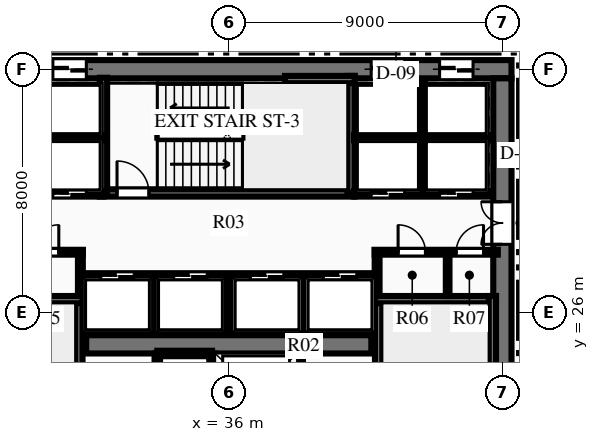
"""IFC4 building model, lengths in metres.
Left out: names, types, materials, properties, quantities, classifications, styles, units other than length and angle.
Written with IfcOpenShell. Run it as: python <this file> out.ifc"""

import sys

from ifc_helpers import new_model, si_unit, direction, frame, frame_2d, origin, place, context, subcontext, project, spatial, rectangle, extrude, element, fill, save


model = new_model("IFC4")
c1 = context("Model", 3, precision=1e-05, world=origin(), true_north=direction((0.0, 1.0)))
c2 = subcontext(c1, "Body", "Model", "MODEL_VIEW")
j1 = project(units=[si_unit("LENGTHUNIT", "METRE"), si_unit("PLANEANGLEUNIT", "RADIAN")], contexts=[c1])
p1 = place(None, origin())
s1 = spatial("IfcSite", under=j1, at=p1, CompositionType="ELEMENT")
p2 = place(p1, origin())
s2 = spatial("IfcBuilding", under=s1, at=p2, CompositionType="ELEMENT")
p3 = place(p2, frame((0.0, 0.0, 40.2)))
s3 = spatial("IfcBuildingStorey", under=s2, at=p3, CompositionType="ELEMENT", Elevation=40.2)
p4 = place(p3, frame((26.7, 34.0, 0.0), z_axis=(0.0, 0.0, 1.0), x_axis=(1.0, 0.0, 0.0)))
e1 = element("IfcWall", 1, at=p4, inside=s3, PredefinedType="SHEAR", context=c2, shape_type="SweptSolid", body=[
    extrude(rectangle(XDim=18.6, YDim=0.6, at=frame_2d((9.3, 0.0))), origin(), (0.0, 0.0, 1.0), 3.75),
])
p5 = place(p4, frame((1.265, 0.0, 0.0)))
e2 = element("IfcOpeningElement", 2, at=p5, cuts=e1, PredefinedType="OPENING", context=c2, shape_type="SweptSolid", body=[
    extrude(rectangle(XDim=1.1, YDim=2.15, at=frame_2d((0.55, 1.075))), frame((0.0, 0.31, 0.0), z_axis=(0.0, -1.0, 0.0), x_axis=(1.0, 0.0, 0.0)), (0.0, 0.0, 1.0), 0.62),
])
p6 = place(p4, frame((3.515, 0.0, 0.0)))
e3 = element("IfcOpeningElement", 3, at=p6, cuts=e1, PredefinedType="OPENING", context=c2, shape_type="SweptSolid", body=[
    extrude(rectangle(XDim=1.1, YDim=2.15, at=frame_2d((0.55, 1.075))), frame((0.0, 0.31, 0.0), z_axis=(0.0, -1.0, 0.0), x_axis=(1.0, 0.0, 0.0)), (0.0, 0.0, 1.0), 0.62),
])
p7 = place(p4, frame((13.985, 0.0, 0.0)))
e4 = element("IfcOpeningElement", 4, at=p7, cuts=e1, PredefinedType="OPENING", context=c2, shape_type="SweptSolid", body=[
    extrude(rectangle(XDim=1.1, YDim=2.15, at=frame_2d((0.55, 1.075))), frame((0.0, 0.31, 0.0), z_axis=(0.0, -1.0, 0.0), x_axis=(1.0, 0.0, 0.0)), (0.0, 0.0, 1.0), 0.62),
])
p8 = place(p4, frame((16.235, 0.0, 0.0)))
e5 = element("IfcOpeningElement", 5, at=p8, cuts=e1, PredefinedType="OPENING", context=c2, shape_type="SweptSolid", body=[
    extrude(rectangle(XDim=1.1, YDim=2.15, at=frame_2d((0.55, 1.075))), frame((0.0, 0.31, 0.0), z_axis=(0.0, -1.0, 0.0), x_axis=(1.0, 0.0, 0.0)), (0.0, 0.0, 1.0), 0.62),
])
p9 = place(p3, frame((45.0, 18.3, 0.0), z_axis=(0.0, 0.0, 1.0), x_axis=(0.0, 1.0, 0.0)))
e6 = element("IfcWall", 6, at=p9, inside=s3, PredefinedType="SHEAR", context=c2, shape_type="SweptSolid", body=[
    extrude(rectangle(XDim=15.4, YDim=0.6, at=frame_2d((7.7, 0.0))), origin(), (0.0, 0.0, 1.0), 3.75),
])
p10 = place(p9, frame((9.94, 0.0, 0.0)))
e7 = element("IfcOpeningElement", 7, at=p10, cuts=e6, PredefinedType="OPENING", context=c2, shape_type="SweptSolid", body=[
    extrude(rectangle(XDim=1.4, YDim=2.2, at=frame_2d((0.7, 1.1))), frame((0.0, 0.31, 0.0), z_axis=(0.0, -1.0, 0.0), x_axis=(1.0, 0.0, 0.0)), (0.0, 0.0, 1.0), 0.62),
])
p11 = place(p3, frame((31.31, 24.95, 0.0), z_axis=(0.0, 0.0, 1.0), x_axis=(1.0, 0.0, 0.0)))
e8 = element("IfcWall", 8, at=p11, inside=s3, PredefinedType="SHEAR", context=c2, shape_type="SweptSolid", body=[
    extrude(rectangle(XDim=9.38, YDim=0.6, at=frame_2d((4.69, 0.0))), origin(), (0.0, 0.0, 1.0), 3.75),
])
p12 = place(p3, frame((31.07, 18.28, 0.0), z_axis=(0.0, 0.0, 1.0), x_axis=(0.0, 1.0, 0.0)))
e9 = element("IfcWall", 9, at=p12, inside=s3, PredefinedType="SHEAR", context=c2, shape_type="SweptSolid", body=[
    extrude(rectangle(XDim=8.26, YDim=0.24, at=frame_2d((4.13, 0.0))), origin(), (0.0, 0.0, 1.0), 3.75),
])
p13 = place(p12, frame((0.365, 0.0, 0.0)))
e10 = element("IfcOpeningElement", 10, at=p13, cuts=e9, PredefinedType="OPENING", context=c2, shape_type="SweptSolid", body=[
    extrude(rectangle(XDim=1.05, YDim=2.15, at=frame_2d((0.525, 1.075))), frame((0.0, 0.13, 0.0), z_axis=(0.0, -1.0, 0.0), x_axis=(1.0, 0.0, 0.0)), (0.0, 0.0, 1.0), 0.26),
])
p14 = place(p3, frame((27.21, 26.42, 0.0), z_axis=(0.0, 0.0, 1.0), x_axis=(1.0, 0.0, 0.0)))
e11 = element("IfcWall", 11, at=p14, inside=s3, PredefinedType="SHEAR", context=c2, shape_type="SweptSolid", body=[
    extrude(rectangle(XDim=3.98, YDim=0.24, at=frame_2d((1.99, 0.0))), origin(), (0.0, 0.0, 1.0), 3.75),
])
p15 = place(p3, frame((40.93, 18.28, 0.0), z_axis=(0.0, 0.0, 1.0), x_axis=(0.0, 1.0, 0.0)))
e12 = element("IfcWall", 12, at=p15, inside=s3, PredefinedType="SHEAR", context=c2, shape_type="SweptSolid", body=[
    extrude(rectangle(XDim=8.26, YDim=0.24, at=frame_2d((4.13, 0.0))), origin(), (0.0, 0.0, 1.0), 3.75),
])
p16 = place(p15, frame((0.365, 0.0, 0.0)))
e13 = element("IfcOpeningElement", 13, at=p16, cuts=e12, PredefinedType="OPENING", context=c2, shape_type="SweptSolid", body=[
    extrude(rectangle(XDim=1.05, YDim=2.15, at=frame_2d((0.525, 1.075))), frame((0.0, 0.13, 0.0), z_axis=(0.0, -1.0, 0.0), x_axis=(1.0, 0.0, 0.0)), (0.0, 0.0, 1.0), 0.26),
])
p17 = place(p3, frame((40.81, 26.42, 0.0), z_axis=(0.0, 0.0, 1.0), x_axis=(1.0, 0.0, 0.0)))
e14 = element("IfcWall", 14, at=p17, inside=s3, PredefinedType="SHEAR", context=c2, shape_type="SweptSolid", body=[
    extrude(rectangle(XDim=3.98, YDim=0.24, at=frame_2d((1.99, 0.0))), origin(), (0.0, 0.0, 1.0), 3.75),
])
p18 = place(p3, frame((44.67, 18.28, 0.0), z_axis=(0.0, 0.0, 1.0), x_axis=(0.0, 1.0, 0.0)))
e15 = element("IfcWall", 15, at=p18, inside=s3, PredefinedType="SHEAR", context=c2, shape_type="SweptSolid", body=[
    extrude(rectangle(XDim=8.26, YDim=0.24, at=frame_2d((4.13, 0.0))), origin(), (0.0, 0.0, 1.0), 3.75),
])
p19 = place(p3, frame((31.76, 29.93, 0.0), z_axis=(0.0, 0.0, 1.0), x_axis=(1.0, 0.0, 0.0)))
e16 = element("IfcWall", 16, at=p19, inside=s3, PredefinedType="SHEAR", context=c2, shape_type="SweptSolid", body=[
    extrude(rectangle(XDim=8.38, YDim=0.24, at=frame_2d((4.19, 0.0))), origin(), (0.0, 0.0, 1.0), 3.75),
])
p20 = place(p19, frame((0.565, 0.0, 0.0)))
e17 = element("IfcOpeningElement", 17, at=p20, cuts=e16, PredefinedType="OPENING", context=c2, shape_type="SweptSolid", body=[
    extrude(rectangle(XDim=1.05, YDim=2.15, at=frame_2d((0.525, 1.075))), frame((0.0, 0.13, 0.0), z_axis=(0.0, -1.0, 0.0), x_axis=(1.0, 0.0, 0.0)), (0.0, 0.0, 1.0), 0.26),
])
p21 = place(p3, frame((31.88, 29.93, 0.0), z_axis=(0.0, 0.0, 1.0), x_axis=(0.0, 1.0, 0.0)))
e18 = element("IfcWall", 18, at=p21, inside=s3, PredefinedType="SHEAR", context=c2, shape_type="SweptSolid", body=[
    extrude(rectangle(XDim=3.79, YDim=0.24, at=frame_2d((1.895, 0.0))), origin(), (0.0, 0.0, 1.0), 3.75),
])
p22 = place(p3, frame((40.02, 29.93, 0.0), z_axis=(0.0, 0.0, 1.0), x_axis=(0.0, 1.0, 0.0)))
e19 = element("IfcWall", 19, at=p22, inside=s3, PredefinedType="SHEAR", context=c2, shape_type="SweptSolid", body=[
    extrude(rectangle(XDim=3.85, YDim=0.24, at=frame_2d((1.925, 0.0))), origin(), (0.0, 0.0, 1.0), 3.75),
])
p23 = place(p3, frame((37.85, 33.66, 0.0), z_axis=(0.0, 0.0, 1.0), x_axis=(1.0, 0.0, 0.0)))
e20 = element("IfcWall", 20, at=p23, inside=s3, PredefinedType="SHEAR", context=c2, shape_type="SweptSolid", body=[
    extrude(rectangle(XDim=2.29, YDim=0.24, at=frame_2d((1.145, 0.0))), origin(), (0.0, 0.0, 1.0), 3.75),
])
for number, where, z_axis, x_axis in (
    (21, (33.65, 22.05, 0.0), (0.0, 0.0, 1.0), (0.0, 1.0, 0.0)),
    (22, (35.45, 22.05, 0.0), (0.0, 0.0, 1.0), (0.0, 1.0, 0.0)),
):
    element("IfcWall", number, at=place(p3, frame(where, z_axis=z_axis, x_axis=x_axis)), inside=s3, PredefinedType="PARTITIONING", context=c2, shape_type="SweptSolid", body=[
        extrude(rectangle(XDim=2.6, YDim=0.18, at=frame_2d((1.3, 0.0))), origin(), (0.0, 0.0, 1.0), 3.44),
    ])
p24 = place(p3, frame((33.65, 24.65, 0.0), z_axis=(0.0, 0.0, 1.0), x_axis=(1.0, 0.0, 0.0)))
e23 = element("IfcWall", 23, at=p24, inside=s3, PredefinedType="PARTITIONING", context=c2, shape_type="SweptSolid", body=[
    extrude(rectangle(XDim=1.8, YDim=0.18, at=frame_2d((0.9, 0.0))), origin(), (0.0, 0.0, 1.0), 3.44),
])
p25 = place(p3, frame((38.35, 22.05, 0.0), z_axis=(0.0, 0.0, 1.0), x_axis=(0.0, 1.0, 0.0)))
e24 = element("IfcWall", 24, at=p25, inside=s3, PredefinedType="PARTITIONING", context=c2, shape_type="SweptSolid", body=[
    extrude(rectangle(XDim=2.6, YDim=0.18, at=frame_2d((1.3, 0.0))), origin(), (0.0, 0.0, 1.0), 3.44),
])
p26 = place(p3, frame((27.15, 27.98, 0.0), z_axis=(0.0, 0.0, 1.0), x_axis=(1.0, 0.0, 0.0)))
e25 = element("IfcWall", 25, at=p26, inside=s3, PredefinedType="PARTITIONING", context=c2, shape_type="SweptSolid", body=[
    extrude(rectangle(XDim=4.05, YDim=0.16, at=frame_2d((2.025, 0.0))), origin(), (0.0, 0.0, 1.0), 3.44),
])
p27 = place(p26, frame((0.47, 0.0, 0.0)))
e26 = element("IfcOpeningElement", 26, at=p27, cuts=e25, PredefinedType="OPENING", context=c2, shape_type="SweptSolid", body=[
    extrude(rectangle(XDim=0.9, YDim=2.15, at=frame_2d((0.45, 1.075))), frame((0.0, 0.09, 0.0), z_axis=(0.0, -1.0, 0.0), x_axis=(1.0, 0.0, 0.0)), (0.0, 0.0, 1.0), 0.18),
])
p28 = place(p26, frame((2.36, 0.0, 0.0)))
e27 = element("IfcOpeningElement", 27, at=p28, cuts=e25, PredefinedType="OPENING", context=c2, shape_type="SweptSolid", body=[
    extrude(rectangle(XDim=0.9, YDim=2.15, at=frame_2d((0.45, 1.075))), frame((0.0, 0.09, 0.0), z_axis=(0.0, -1.0, 0.0), x_axis=(1.0, 0.0, 0.0)), (0.0, 0.0, 1.0), 0.18),
])
p29 = place(p3, frame((31.12, 26.54, 0.0), z_axis=(0.0, 0.0, 1.0), x_axis=(0.0, 1.0, 0.0)))
e28 = element("IfcWall", 28, at=p29, inside=s3, PredefinedType="PARTITIONING", context=c2, shape_type="SweptSolid", body=[
    extrude(rectangle(XDim=1.51, YDim=0.16, at=frame_2d((0.755, 0.0))), origin(), (0.0, 0.0, 1.0), 3.44),
])
p30 = place(p3, frame((40.8, 27.98, 0.0), z_axis=(0.0, 0.0, 1.0), x_axis=(1.0, 0.0, 0.0)))
e29 = element("IfcWall", 29, at=p30, inside=s3, PredefinedType="PARTITIONING", context=c2, shape_type="SweptSolid", body=[
    extrude(rectangle(XDim=4.05, YDim=0.16, at=frame_2d((2.025, 0.0))), origin(), (0.0, 0.0, 1.0), 3.44),
])
p31 = place(p30, frame((0.77, 0.0, 0.0)))
e30 = element("IfcOpeningElement", 30, at=p31, cuts=e29, PredefinedType="OPENING", context=c2, shape_type="SweptSolid", body=[
    extrude(rectangle(XDim=0.9, YDim=2.15, at=frame_2d((0.45, 1.075))), frame((0.0, 0.09, 0.0), z_axis=(0.0, -1.0, 0.0), x_axis=(1.0, 0.0, 0.0)), (0.0, 0.0, 1.0), 0.18),
])
p32 = place(p30, frame((2.68, 0.0, 0.0)))
e31 = element("IfcOpeningElement", 31, at=p32, cuts=e29, PredefinedType="OPENING", context=c2, shape_type="SweptSolid", body=[
    extrude(rectangle(XDim=0.9, YDim=2.15, at=frame_2d((0.45, 1.075))), frame((0.0, 0.09, 0.0), z_axis=(0.0, -1.0, 0.0), x_axis=(1.0, 0.0, 0.0)), (0.0, 0.0, 1.0), 0.18),
])
p33 = place(p3, frame((40.88, 26.54, 0.0), z_axis=(0.0, 0.0, 1.0), x_axis=(0.0, 1.0, 0.0)))
e32 = element("IfcWall", 32, at=p33, inside=s3, PredefinedType="PARTITIONING", context=c2, shape_type="SweptSolid", body=[
    extrude(rectangle(XDim=1.51, YDim=0.16, at=frame_2d((0.755, 0.0))), origin(), (0.0, 0.0, 1.0), 3.44),
])
p34 = place(p3, frame((43.2, 26.54, 0.0), z_axis=(0.0, 0.0, 1.0), x_axis=(0.0, 1.0, 0.0)))
e33 = element("IfcWall", 33, at=p34, inside=s3, PredefinedType="PARTITIONING", context=c2, shape_type="SweptSolid", body=[
    extrude(rectangle(XDim=1.44, YDim=0.12, at=frame_2d((0.72, 0.0))), origin(), (0.0, 0.0, 1.0), 3.44),
])
p35 = place(p3, frame((27.45, 29.9, 0.0), z_axis=(0.0, 0.0, 1.0), x_axis=(1.0, 0.0, 0.0)))
e34 = element("IfcWall", 34, at=p35, inside=s3, PredefinedType="PARTITIONING", context=c2, shape_type="SweptSolid", body=[
    extrude(rectangle(XDim=4.43, YDim=0.18, at=frame_2d((2.215, 0.0))), origin(), (0.0, 0.0, 1.0), 3.44),
])
p36 = place(p35, frame((0.515, 0.0, 0.0)))
e35 = element("IfcOpeningElement", 35, at=p36, cuts=e34, PredefinedType="OPENING", context=c2, shape_type="SweptSolid", body=[
    extrude(rectangle(XDim=1.1, YDim=2.15, at=frame_2d((0.55, 1.075))), frame((0.0, 0.1, 0.0), z_axis=(0.0, -1.0, 0.0), x_axis=(1.0, 0.0, 0.0)), (0.0, 0.0, 1.0), 0.2),
])
p37 = place(p35, frame((2.765, 0.0, 0.0)))
e36 = element("IfcOpeningElement", 36, at=p37, cuts=e34, PredefinedType="OPENING", context=c2, shape_type="SweptSolid", body=[
    extrude(rectangle(XDim=1.1, YDim=2.15, at=frame_2d((0.55, 1.075))), frame((0.0, 0.1, 0.0), z_axis=(0.0, -1.0, 0.0), x_axis=(1.0, 0.0, 0.0)), (0.0, 0.0, 1.0), 0.2),
])
p38 = place(p3, frame((27.45, 31.75, 0.0), z_axis=(0.0, 0.0, 1.0), x_axis=(1.0, 0.0, 0.0)))
e37 = element("IfcWall", 37, at=p38, inside=s3, PredefinedType="PARTITIONING", context=c2, shape_type="SweptSolid", body=[
    extrude(rectangle(XDim=4.43, YDim=0.18, at=frame_2d((2.215, 0.0))), origin(), (0.0, 0.0, 1.0), 3.44),
])
p39 = place(p3, frame((40.12, 29.9, 0.0), z_axis=(0.0, 0.0, 1.0), x_axis=(1.0, 0.0, 0.0)))
e38 = element("IfcWall", 38, at=p39, inside=s3, PredefinedType="PARTITIONING", context=c2, shape_type="SweptSolid", body=[
    extrude(rectangle(XDim=4.43, YDim=0.18, at=frame_2d((2.215, 0.0))), origin(), (0.0, 0.0, 1.0), 3.44),
])
p40 = place(p39, frame((0.565, 0.0, 0.0)))
e39 = element("IfcOpeningElement", 39, at=p40, cuts=e38, PredefinedType="OPENING", context=c2, shape_type="SweptSolid", body=[
    extrude(rectangle(XDim=1.1, YDim=2.15, at=frame_2d((0.55, 1.075))), frame((0.0, 0.1, 0.0), z_axis=(0.0, -1.0, 0.0), x_axis=(1.0, 0.0, 0.0)), (0.0, 0.0, 1.0), 0.2),
])
p41 = place(p39, frame((2.815, 0.0, 0.0)))
e40 = element("IfcOpeningElement", 40, at=p41, cuts=e38, PredefinedType="OPENING", context=c2, shape_type="SweptSolid", body=[
    extrude(rectangle(XDim=1.1, YDim=2.15, at=frame_2d((0.55, 1.075))), frame((0.0, 0.1, 0.0), z_axis=(0.0, -1.0, 0.0), x_axis=(1.0, 0.0, 0.0)), (0.0, 0.0, 1.0), 0.2),
])
p42 = place(p3, frame((40.12, 31.75, 0.0), z_axis=(0.0, 0.0, 1.0), x_axis=(1.0, 0.0, 0.0)))
e41 = element("IfcWall", 41, at=p42, inside=s3, PredefinedType="PARTITIONING", context=c2, shape_type="SweptSolid", body=[
    extrude(rectangle(XDim=4.43, YDim=0.18, at=frame_2d((2.215, 0.0))), origin(), (0.0, 0.0, 1.0), 3.44),
])
p43 = place(p3, frame((42.37, 29.9, 0.0), z_axis=(0.0, 0.0, 1.0), x_axis=(0.0, 1.0, 0.0)))
e42 = element("IfcWall", 42, at=p43, inside=s3, PredefinedType="PARTITIONING", context=c2, shape_type="SweptSolid", body=[
    extrude(rectangle(XDim=3.75, YDim=0.18, at=frame_2d((1.875, 0.0))), origin(), (0.0, 0.0, 1.0), 3.44),
])
p44 = place(p3, frame((31.2, 27.2, 0.0), z_axis=(0.0, 0.0, 1.0), x_axis=(1.0, 0.0, 0.0)))
e43 = element("IfcWall", 43, at=p44, inside=s3, PredefinedType="PARTITIONING", context=c2, shape_type="SweptSolid", body=[
    extrude(rectangle(XDim=9.6, YDim=0.18, at=frame_2d((4.8, 0.0))), origin(), (0.0, 0.0, 1.0), 3.44),
])
p45 = place(p44, frame((0.59, 0.0, 0.0)))
e44 = element("IfcOpeningElement", 44, at=p45, cuts=e43, PredefinedType="OPENING", context=c2, shape_type="SweptSolid", body=[
    extrude(rectangle(XDim=1.1, YDim=2.15, at=frame_2d((0.55, 1.075))), frame((0.0, 0.1, 0.0), z_axis=(0.0, -1.0, 0.0), x_axis=(1.0, 0.0, 0.0)), (0.0, 0.0, 1.0), 0.2),
])
p46 = place(p44, frame((2.99, 0.0, 0.0)))
e45 = element("IfcOpeningElement", 45, at=p46, cuts=e43, PredefinedType="OPENING", context=c2, shape_type="SweptSolid", body=[
    extrude(rectangle(XDim=1.1, YDim=2.15, at=frame_2d((0.55, 1.075))), frame((0.0, 0.1, 0.0), z_axis=(0.0, -1.0, 0.0), x_axis=(1.0, 0.0, 0.0)), (0.0, 0.0, 1.0), 0.2),
])
p47 = place(p44, frame((5.51, 0.0, 0.0)))
e46 = element("IfcOpeningElement", 46, at=p47, cuts=e43, PredefinedType="OPENING", context=c2, shape_type="SweptSolid", body=[
    extrude(rectangle(XDim=1.1, YDim=2.15, at=frame_2d((0.55, 1.075))), frame((0.0, 0.1, 0.0), z_axis=(0.0, -1.0, 0.0), x_axis=(1.0, 0.0, 0.0)), (0.0, 0.0, 1.0), 0.2),
])
p48 = place(p44, frame((7.91, 0.0, 0.0)))
e47 = element("IfcOpeningElement", 47, at=p48, cuts=e43, PredefinedType="OPENING", context=c2, shape_type="SweptSolid", body=[
    extrude(rectangle(XDim=1.1, YDim=2.15, at=frame_2d((0.55, 1.075))), frame((0.0, 0.1, 0.0), z_axis=(0.0, -1.0, 0.0), x_axis=(1.0, 0.0, 0.0)), (0.0, 0.0, 1.0), 0.2),
])
for number, where, z_axis, x_axis in (
    (48, (33.54, 25.3, 0.0), (0.0, 0.0, 1.0), (0.0, 1.0, 0.0)),
    (49, (36.0, 25.3, 0.0), (0.0, 0.0, 1.0), (0.0, 1.0, 0.0)),
    (50, (38.46, 25.3, 0.0), (0.0, 0.0, 1.0), (0.0, 1.0, 0.0)),
):
    element("IfcWall", number, at=place(p3, frame(where, z_axis=z_axis, x_axis=x_axis)), inside=s3, PredefinedType="PARTITIONING", context=c2, shape_type="SweptSolid", body=[
        extrude(rectangle(XDim=1.9, YDim=0.18, at=frame_2d((0.95, 0.0))), origin(), (0.0, 0.0, 1.0), 3.44),
    ])
p49 = place(p28, origin())
e51 = element("IfcDoor", 51, at=p49, inside=s3, OperationType="SINGLE_SWING_RIGHT", PredefinedType="DOOR", context=c2, shape_type="SweptSolid", body=[
    extrude(rectangle(XDim=0.9, YDim=2.15, at=frame_2d((0.45, 1.075))), frame((0.0, 0.025, 0.0), z_axis=(0.0, -1.0, 0.0), x_axis=(1.0, 0.0, 0.0)), (0.0, 0.0, 1.0), 0.05),
])
fill(e27, e51)
p50 = place(p31, origin())
e52 = element("IfcDoor", 52, at=p50, inside=s3, OperationType="SINGLE_SWING_LEFT", PredefinedType="DOOR", context=c2, shape_type="SweptSolid", body=[
    extrude(rectangle(XDim=0.9, YDim=2.15, at=frame_2d((0.45, 1.075))), frame((0.0, 0.025, 0.0), z_axis=(0.0, -1.0, 0.0), x_axis=(1.0, 0.0, 0.0)), (0.0, 0.0, 1.0), 0.05),
])
fill(e30, e52)
p51 = place(p32, origin())
e53 = element("IfcDoor", 53, at=p51, inside=s3, OperationType="SINGLE_SWING_RIGHT", PredefinedType="DOOR", context=c2, shape_type="SweptSolid", body=[
    extrude(rectangle(XDim=0.9, YDim=2.15, at=frame_2d((0.45, 1.075))), frame((0.0, 0.025, 0.0), z_axis=(0.0, -1.0, 0.0), x_axis=(1.0, 0.0, 0.0)), (0.0, 0.0, 1.0), 0.05),
])
fill(e31, e53)
p52 = place(p20, origin())
e54 = element("IfcDoor", 54, at=p52, inside=s3, OperationType="SINGLE_SWING_LEFT", PredefinedType="DOOR", context=c2, shape_type="SweptSolid", body=[
    extrude(rectangle(XDim=1.05, YDim=2.15, at=frame_2d((0.525, 1.075))), frame((0.0, 0.025, 0.0), z_axis=(0.0, -1.0, 0.0), x_axis=(1.0, 0.0, 0.0)), (0.0, 0.0, 1.0), 0.05),
])
fill(e17, e54)
p53 = place(p10, origin())
e55 = element("IfcDoor", 55, at=p53, inside=s3, OperationType="DOUBLE_DOOR_SINGLE_SWING", PredefinedType="DOOR", context=c2, shape_type="SweptSolid", body=[
    extrude(rectangle(XDim=1.4, YDim=2.2, at=frame_2d((0.7, 1.1))), frame((0.0, 0.025, 0.0), z_axis=(0.0, -1.0, 0.0), x_axis=(1.0, 0.0, 0.0)), (0.0, 0.0, 1.0), 0.05),
])
fill(e7, e55)
p54 = place(p37, origin())
e56 = element("IfcDoor", 56, at=p54, inside=s3, OperationType="SLIDING_TO_LEFT", PredefinedType="DOOR", context=c2, shape_type="SweptSolid", body=[
    extrude(rectangle(XDim=1.1, YDim=2.15, at=frame_2d((0.55, 1.075))), frame((0.0, 0.025, 0.0), z_axis=(0.0, -1.0, 0.0), x_axis=(1.0, 0.0, 0.0)), (0.0, 0.0, 1.0), 0.05),
])
fill(e36, e56)
p55 = place(p6, origin())
e57 = element("IfcDoor", 57, at=p55, inside=s3, OperationType="SLIDING_TO_LEFT", PredefinedType="DOOR", context=c2, shape_type="SweptSolid", body=[
    extrude(rectangle(XDim=1.1, YDim=2.15, at=frame_2d((0.55, 1.075))), frame((0.0, 0.025, 0.0), z_axis=(0.0, -1.0, 0.0), x_axis=(1.0, 0.0, 0.0)), (0.0, 0.0, 1.0), 0.05),
])
fill(e3, e57)
p56 = place(p40, origin())
e58 = element("IfcDoor", 58, at=p56, inside=s3, OperationType="SLIDING_TO_LEFT", PredefinedType="DOOR", context=c2, shape_type="SweptSolid", body=[
    extrude(rectangle(XDim=1.1, YDim=2.15, at=frame_2d((0.55, 1.075))), frame((0.0, 0.025, 0.0), z_axis=(0.0, -1.0, 0.0), x_axis=(1.0, 0.0, 0.0)), (0.0, 0.0, 1.0), 0.05),
])
fill(e39, e58)
p57 = place(p41, origin())
e59 = element("IfcDoor", 59, at=p57, inside=s3, OperationType="SLIDING_TO_LEFT", PredefinedType="DOOR", context=c2, shape_type="SweptSolid", body=[
    extrude(rectangle(XDim=1.1, YDim=2.15, at=frame_2d((0.55, 1.075))), frame((0.0, 0.025, 0.0), z_axis=(0.0, -1.0, 0.0), x_axis=(1.0, 0.0, 0.0)), (0.0, 0.0, 1.0), 0.05),
])
fill(e40, e59)
p58 = place(p7, origin())
e60 = element("IfcDoor", 60, at=p58, inside=s3, OperationType="SLIDING_TO_LEFT", PredefinedType="DOOR", context=c2, shape_type="SweptSolid", body=[
    extrude(rectangle(XDim=1.1, YDim=2.15, at=frame_2d((0.55, 1.075))), frame((0.0, 0.025, 0.0), z_axis=(0.0, -1.0, 0.0), x_axis=(1.0, 0.0, 0.0)), (0.0, 0.0, 1.0), 0.05),
])
fill(e4, e60)
p59 = place(p8, origin())
e61 = element("IfcDoor", 61, at=p59, inside=s3, OperationType="SLIDING_TO_LEFT", PredefinedType="DOOR", context=c2, shape_type="SweptSolid", body=[
    extrude(rectangle(XDim=1.1, YDim=2.15, at=frame_2d((0.55, 1.075))), frame((0.0, 0.025, 0.0), z_axis=(0.0, -1.0, 0.0), x_axis=(1.0, 0.0, 0.0)), (0.0, 0.0, 1.0), 0.05),
])
fill(e5, e61)
p60 = place(p45, origin())
e62 = element("IfcDoor", 62, at=p60, inside=s3, OperationType="SLIDING_TO_LEFT", PredefinedType="DOOR", context=c2, shape_type="SweptSolid", body=[
    extrude(rectangle(XDim=1.1, YDim=2.15, at=frame_2d((0.55, 1.075))), frame((0.0, 0.025, 0.0), z_axis=(0.0, -1.0, 0.0), x_axis=(1.0, 0.0, 0.0)), (0.0, 0.0, 1.0), 0.05),
])
fill(e44, e62)
p61 = place(p46, origin())
e63 = element("IfcDoor", 63, at=p61, inside=s3, OperationType="SLIDING_TO_LEFT", PredefinedType="DOOR", context=c2, shape_type="SweptSolid", body=[
    extrude(rectangle(XDim=1.1, YDim=2.15, at=frame_2d((0.55, 1.075))), frame((0.0, 0.025, 0.0), z_axis=(0.0, -1.0, 0.0), x_axis=(1.0, 0.0, 0.0)), (0.0, 0.0, 1.0), 0.05),
])
fill(e45, e63)
p62 = place(p47, origin())
e64 = element("IfcDoor", 64, at=p62, inside=s3, OperationType="SLIDING_TO_LEFT", PredefinedType="DOOR", context=c2, shape_type="SweptSolid", body=[
    extrude(rectangle(XDim=1.1, YDim=2.15, at=frame_2d((0.55, 1.075))), frame((0.0, 0.025, 0.0), z_axis=(0.0, -1.0, 0.0), x_axis=(1.0, 0.0, 0.0)), (0.0, 0.0, 1.0), 0.05),
])
fill(e46, e64)
p63 = place(p48, origin())
e65 = element("IfcDoor", 65, at=p63, inside=s3, OperationType="SLIDING_TO_LEFT", PredefinedType="DOOR", context=c2, shape_type="SweptSolid", body=[
    extrude(rectangle(XDim=1.1, YDim=2.15, at=frame_2d((0.55, 1.075))), frame((0.0, 0.025, 0.0), z_axis=(0.0, -1.0, 0.0), x_axis=(1.0, 0.0, 0.0)), (0.0, 0.0, 1.0), 0.05),
])
fill(e47, e65)
save(model, sys.argv[1])
